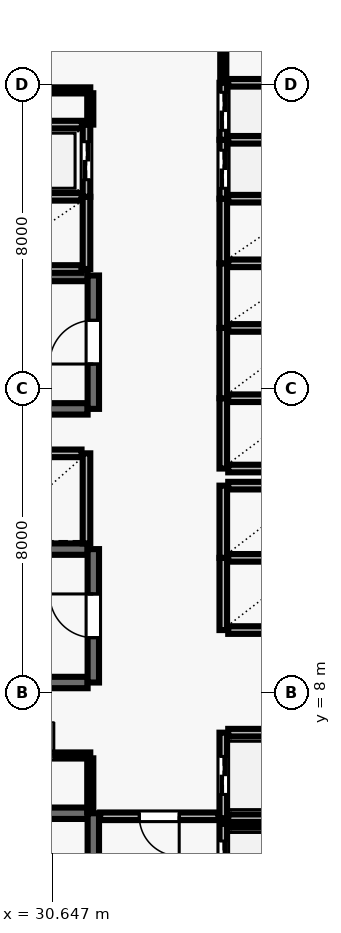
"""IFC4 building model, lengths in metres.
Left out: names, types, materials, properties, quantities, classifications, styles, units other than length and angle.
Written with IfcOpenShell. Run it as: python <this file> out.ifc"""

import sys

from ifc_helpers import new_model, si_unit, direction, frame, frame_2d, origin, place, context, subcontext, project, spatial, rectangle, extrude, element, fill, save


model = new_model("IFC4")
c1 = context("Model", 3, precision=1e-05, world=origin(), true_north=direction((0.0, 1.0)))
c2 = subcontext(c1, "Body", "Model", "MODEL_VIEW")
j1 = project(units=[si_unit("LENGTHUNIT", "METRE"), si_unit("PLANEANGLEUNIT", "RADIAN")], contexts=[c1])
p1 = place(None, origin())
s1 = spatial("IfcSite", under=j1, at=p1, CompositionType="ELEMENT")
p2 = place(p1, origin())
s2 = spatial("IfcBuilding", under=s1, at=p2, CompositionType="ELEMENT")
p3 = place(p2, frame((0.0, 0.0, 50.5)))
s3 = spatial("IfcBuildingStorey", under=s2, at=p3, CompositionType="ELEMENT", Elevation=50.5)
p4 = place(p3, frame((31.58, 4.83, 0.0), z_axis=(0.0, 0.0, 1.0), x_axis=(-1.0, 0.0, 0.0)))
e1 = element("IfcWall", 1, at=p4, inside=s3, PredefinedType="SHEAR", context=c2, shape_type="SweptSolid", body=[
    extrude(rectangle(XDim=8.36, YDim=0.3, at=frame_2d((4.18, 0.0))), origin(), (0.0, 0.0, 1.0), 3.69),
])
p5 = place(p3, frame((31.73, 0.96, 0.0), z_axis=(0.0, 0.0, 1.0), x_axis=(0.0, 1.0, 0.0)))
e2 = element("IfcWall", 2, at=p5, inside=s3, PredefinedType="SHEAR", context=c2, shape_type="SweptSolid", body=[
    extrude(rectangle(XDim=3.87, YDim=0.3, at=frame_2d((1.935, 0.0))), origin(), (0.0, 0.0, 1.0), 3.69),
])
p6 = place(p5, frame((1.54, 0.0, 0.0)))
e3 = element("IfcOpeningElement", 3, at=p6, cuts=e2, PredefinedType="OPENING", context=c2, shape_type="SweptSolid", body=[
    extrude(rectangle(XDim=1.15, YDim=2.15, at=frame_2d((0.575, 1.075))), frame((0.0, 0.16, 0.0), z_axis=(0.0, -1.0, 0.0), x_axis=(1.0, 0.0, 0.0)), (0.0, 0.0, 1.0), 0.32),
])
for number, where, z_axis, x_axis in (
    (4, (31.58, 18.98, 0.0), (0.0, 0.0, 1.0), (-1.0, 0.0, 0.0)),
    (5, (23.22, 15.47, 0.0), (0.0, 0.0, 1.0), (1.0, 0.0, 0.0)),
):
    element("IfcWall", number, at=place(p3, frame(where, z_axis=z_axis, x_axis=x_axis)), inside=s3, PredefinedType="SHEAR", context=c2, shape_type="SweptSolid", body=[
        extrude(rectangle(XDim=8.36, YDim=0.3, at=frame_2d((4.18, 0.0))), origin(), (0.0, 0.0, 1.0), 3.69),
    ])
p7 = place(p3, frame((31.73, 15.47, 0.0), z_axis=(0.0, 0.0, 1.0), x_axis=(0.0, 1.0, 0.0)))
e6 = element("IfcWall", 6, at=p7, inside=s3, PredefinedType="SHEAR", context=c2, shape_type="SweptSolid", body=[
    extrude(rectangle(XDim=3.51, YDim=0.3, at=frame_2d((1.755, 0.0))), origin(), (0.0, 0.0, 1.0), 3.69),
])
p8 = place(p7, frame((1.18, 0.0, 0.0)))
e7 = element("IfcOpeningElement", 7, at=p8, cuts=e6, PredefinedType="OPENING", context=c2, shape_type="SweptSolid", body=[
    extrude(rectangle(XDim=1.15, YDim=2.15, at=frame_2d((0.575, 1.075))), frame((0.0, 0.16, 0.0), z_axis=(0.0, -1.0, 0.0), x_axis=(1.0, 0.0, 0.0)), (0.0, 0.0, 1.0), 0.32),
])
for number, where, z_axis, x_axis in (
    (8, (31.58, 11.78, 0.0), (0.0, 0.0, 1.0), (-1.0, 0.0, 0.0)),
    (9, (23.22, 8.27, 0.0), (0.0, 0.0, 1.0), (1.0, 0.0, 0.0)),
):
    element("IfcWall", number, at=place(p3, frame(where, z_axis=z_axis, x_axis=x_axis)), inside=s3, PredefinedType="SHEAR", context=c2, shape_type="SweptSolid", body=[
        extrude(rectangle(XDim=8.36, YDim=0.3, at=frame_2d((4.18, 0.0))), origin(), (0.0, 0.0, 1.0), 3.69),
    ])
p9 = place(p3, frame((31.73, 8.27, 0.0), z_axis=(0.0, 0.0, 1.0), x_axis=(0.0, 1.0, 0.0)))
e10 = element("IfcWall", 10, at=p9, inside=s3, PredefinedType="SHEAR", context=c2, shape_type="SweptSolid", body=[
    extrude(rectangle(XDim=3.51, YDim=0.3, at=frame_2d((1.755, 0.0))), origin(), (0.0, 0.0, 1.0), 3.69),
])
p10 = place(p9, frame((1.18, 0.0, 0.0)))
e11 = element("IfcOpeningElement", 11, at=p10, cuts=e10, PredefinedType="OPENING", context=c2, shape_type="SweptSolid", body=[
    extrude(rectangle(XDim=1.15, YDim=2.15, at=frame_2d((0.575, 1.075))), frame((0.0, 0.16, 0.0), z_axis=(0.0, -1.0, 0.0), x_axis=(1.0, 0.0, 0.0)), (0.0, 0.0, 1.0), 0.32),
])
p11 = place(p3, frame((35.15, 4.55, 0.0), z_axis=(0.0, 0.0, 1.0), x_axis=(0.0, -1.0, 0.0)))
e12 = element("IfcWall", 12, at=p11, inside=s3, PredefinedType="SOLIDWALL", context=c2, shape_type="SweptSolid", body=[
    extrude(rectangle(XDim=2.1, YDim=0.2, at=frame_2d((1.05, 0.0))), origin(), (0.0, 0.0, 1.0), 3.69),
])
p12 = place(p11, frame((0.45, 0.0, 0.0)))
e13 = element("IfcOpeningElement", 13, at=p12, cuts=e12, PredefinedType="OPENING", context=c2, shape_type="SweptSolid", body=[
    extrude(rectangle(XDim=1.2, YDim=2.15, at=frame_2d((0.6, 1.075))), frame((0.0, 0.11, 0.0), z_axis=(0.0, -1.0, 0.0), x_axis=(1.0, 0.0, 0.0)), (0.0, 0.0, 1.0), 0.22),
])
p13 = place(p3, frame((37.42, 4.55, 0.0), z_axis=(0.0, 0.0, 1.0), x_axis=(-1.0, 0.0, 0.0)))
e14 = element("IfcWall", 14, at=p13, inside=s3, PredefinedType="SOLIDWALL", context=c2, shape_type="SweptSolid", body=[
    extrude(rectangle(XDim=2.14, YDim=0.2, at=frame_2d((1.07, 0.0))), origin(), (0.0, 0.0, 1.0), 3.69),
])
p14 = place(p3, frame((35.15, 6.95, 0.0), z_axis=(0.0, 0.0, 1.0), x_axis=(0.0, -1.0, 0.0)))
e15 = element("IfcWall", 15, at=p14, inside=s3, PredefinedType="SOLIDWALL", context=c2, shape_type="SweptSolid", body=[
    extrude(rectangle(XDim=2.25, YDim=0.2, at=frame_2d((1.125, 0.0))), origin(), (0.0, 0.0, 1.0), 3.69),
])
p15 = place(p14, frame((0.625, 0.0, 0.0)))
e16 = element("IfcOpeningElement", 16, at=p15, cuts=e15, PredefinedType="OPENING", context=c2, shape_type="SweptSolid", body=[
    extrude(rectangle(XDim=1.0, YDim=2.1, at=frame_2d((0.5, 1.05))), frame((0.0, 0.11, 0.0), z_axis=(0.0, -1.0, 0.0), x_axis=(1.0, 0.0, 0.0)), (0.0, 0.0, 1.0), 0.22),
])
for number, where, z_axis, x_axis in (
    (17, (35.28, 4.7, 0.0), (0.0, 0.0, 1.0), (1.0, 0.0, 0.0)),
    (18, (37.42, 6.95, 0.0), (0.0, 0.0, 1.0), (-1.0, 0.0, 0.0)),
):
    element("IfcWall", number, at=place(p3, frame(where, z_axis=z_axis, x_axis=x_axis)), inside=s3, PredefinedType="SOLIDWALL", context=c2, shape_type="SweptSolid", body=[
        extrude(rectangle(XDim=2.14, YDim=0.2, at=frame_2d((1.07, 0.0))), origin(), (0.0, 0.0, 1.0), 3.69),
    ])
p16 = place(p3, frame((35.15, 11.55, 0.0), z_axis=(0.0, 0.0, 1.0), x_axis=(0.0, -1.0, 0.0)))
e19 = element("IfcWall", 19, at=p16, inside=s3, PredefinedType="SOLIDWALL", context=c2, shape_type="SweptSolid", body=[
    extrude(rectangle(XDim=1.9, YDim=0.2, at=frame_2d((0.95, 0.0))), origin(), (0.0, 0.0, 1.0), 3.69),
])
for number, where, z_axis, x_axis in (
    (20, (35.28, 9.65, 0.0), (0.0, 0.0, 1.0), (1.0, 0.0, 0.0)),
    (21, (37.42, 11.55, 0.0), (0.0, 0.0, 1.0), (-1.0, 0.0, 0.0)),
):
    element("IfcWall", number, at=place(p3, frame(where, z_axis=z_axis, x_axis=x_axis)), inside=s3, PredefinedType="SOLIDWALL", context=c2, shape_type="SweptSolid", body=[
        extrude(rectangle(XDim=2.14, YDim=0.2, at=frame_2d((1.07, 0.0))), origin(), (0.0, 0.0, 1.0), 3.69),
    ])
p17 = place(p3, frame((35.15, 13.45, 0.0), z_axis=(0.0, 0.0, 1.0), x_axis=(0.0, -1.0, 0.0)))
e22 = element("IfcWall", 22, at=p17, inside=s3, PredefinedType="SOLIDWALL", context=c2, shape_type="SweptSolid", body=[
    extrude(rectangle(XDim=1.9, YDim=0.2, at=frame_2d((0.95, 0.0))), origin(), (0.0, 0.0, 1.0), 3.69),
])
p18 = place(p3, frame((37.42, 13.45, 0.0), z_axis=(0.0, 0.0, 1.0), x_axis=(-1.0, 0.0, 0.0)))
e23 = element("IfcWall", 23, at=p18, inside=s3, PredefinedType="SOLIDWALL", context=c2, shape_type="SweptSolid", body=[
    extrude(rectangle(XDim=2.14, YDim=0.2, at=frame_2d((1.07, 0.0))), origin(), (0.0, 0.0, 1.0), 3.69),
])
p19 = place(p3, frame((31.55, 11.93, 0.0), z_axis=(0.0, 0.0, 1.0), x_axis=(0.0, 1.0, 0.0)))
e24 = element("IfcWall", 24, at=p19, inside=s3, PredefinedType="SOLIDWALL", context=c2, shape_type="SweptSolid", body=[
    extrude(rectangle(XDim=2.37, YDim=0.2, at=frame_2d((1.185, 0.0))), origin(), (0.0, 0.0, 1.0), 3.69),
])
p20 = place(p3, frame((31.42, 14.3, 0.0), z_axis=(0.0, 0.0, 1.0), x_axis=(-1.0, 0.0, 0.0)))
e25 = element("IfcWall", 25, at=p20, inside=s3, PredefinedType="SOLIDWALL", context=c2, shape_type="SweptSolid", body=[
    extrude(rectangle(XDim=2.44, YDim=0.2, at=frame_2d((1.22, 0.0))), origin(), (0.0, 0.0, 1.0), 3.69),
])
p21 = place(p3, frame((35.15, 15.75, 0.0), z_axis=(0.0, 0.0, 1.0), x_axis=(0.0, -1.0, 0.0)))
e26 = element("IfcWall", 26, at=p21, inside=s3, PredefinedType="SOLIDWALL", context=c2, shape_type="SweptSolid", body=[
    extrude(rectangle(XDim=1.85, YDim=0.2, at=frame_2d((0.925, 0.0))), origin(), (0.0, 0.0, 1.0), 3.69),
])
for number, where, z_axis, x_axis in (
    (27, (35.28, 13.9, 0.0), (0.0, 0.0, 1.0), (1.0, 0.0, 0.0)),
    (28, (37.42, 15.75, 0.0), (0.0, 0.0, 1.0), (-1.0, 0.0, 0.0)),
):
    element("IfcWall", number, at=place(p3, frame(where, z_axis=z_axis, x_axis=x_axis)), inside=s3, PredefinedType="SOLIDWALL", context=c2, shape_type="SweptSolid", body=[
        extrude(rectangle(XDim=2.14, YDim=0.2, at=frame_2d((1.07, 0.0))), origin(), (0.0, 0.0, 1.0), 3.69),
    ])
p22 = place(p3, frame((35.15, 17.6, 0.0), z_axis=(0.0, 0.0, 1.0), x_axis=(0.0, -1.0, 0.0)))
e29 = element("IfcWall", 29, at=p22, inside=s3, PredefinedType="SOLIDWALL", context=c2, shape_type="SweptSolid", body=[
    extrude(rectangle(XDim=1.85, YDim=0.2, at=frame_2d((0.925, 0.0))), origin(), (0.0, 0.0, 1.0), 3.69),
])
p23 = place(p3, frame((37.42, 17.6, 0.0), z_axis=(0.0, 0.0, 1.0), x_axis=(-1.0, 0.0, 0.0)))
e30 = element("IfcWall", 30, at=p23, inside=s3, PredefinedType="SOLIDWALL", context=c2, shape_type="SweptSolid", body=[
    extrude(rectangle(XDim=2.14, YDim=0.2, at=frame_2d((1.07, 0.0))), origin(), (0.0, 0.0, 1.0), 3.69),
])
p24 = place(p3, frame((35.15, 19.3, 0.0), z_axis=(0.0, 0.0, 1.0), x_axis=(0.0, -1.0, 0.0)))
e31 = element("IfcWall", 31, at=p24, inside=s3, PredefinedType="SOLIDWALL", context=c2, shape_type="SweptSolid", body=[
    extrude(rectangle(XDim=1.7, YDim=0.2, at=frame_2d((0.85, 0.0))), origin(), (0.0, 0.0, 1.0), 3.69),
])
p25 = place(p3, frame((37.42, 19.3, 0.0), z_axis=(0.0, 0.0, 1.0), x_axis=(-1.0, 0.0, 0.0)))
e32 = element("IfcWall", 32, at=p25, inside=s3, PredefinedType="SOLIDWALL", context=c2, shape_type="SweptSolid", body=[
    extrude(rectangle(XDim=2.14, YDim=0.2, at=frame_2d((1.07, 0.0))), origin(), (0.0, 0.0, 1.0), 3.69),
])
p26 = place(p3, frame((35.15, 21.0, 0.0), z_axis=(0.0, 0.0, 1.0), x_axis=(0.0, -1.0, 0.0)))
e33 = element("IfcWall", 33, at=p26, inside=s3, PredefinedType="SOLIDWALL", context=c2, shape_type="SweptSolid", body=[
    extrude(rectangle(XDim=1.7, YDim=0.2, at=frame_2d((0.85, 0.0))), origin(), (0.0, 0.0, 1.0), 3.69),
])
p27 = place(p3, frame((37.42, 21.0, 0.0), z_axis=(0.0, 0.0, 1.0), x_axis=(-1.0, 0.0, 0.0)))
e34 = element("IfcWall", 34, at=p27, inside=s3, PredefinedType="SOLIDWALL", context=c2, shape_type="SweptSolid", body=[
    extrude(rectangle(XDim=2.14, YDim=0.2, at=frame_2d((1.07, 0.0))), origin(), (0.0, 0.0, 1.0), 3.69),
])
p28 = place(p3, frame((31.55, 19.15, 0.0), z_axis=(0.0, 0.0, 1.0), x_axis=(0.0, 1.0, 0.0)))
e35 = element("IfcWall", 35, at=p28, inside=s3, PredefinedType="SOLIDWALL", context=c2, shape_type="SweptSolid", body=[
    extrude(rectangle(XDim=1.9, YDim=0.2, at=frame_2d((0.95, 0.0))), origin(), (0.0, 0.0, 1.0), 3.69),
])
for number, where, z_axis, x_axis in (
    (36, (28.98, 19.15, 0.0), (0.0, 0.0, 1.0), (1.0, 0.0, 0.0)),
    (37, (31.42, 21.05, 0.0), (0.0, 0.0, 1.0), (-1.0, 0.0, 0.0)),
):
    element("IfcWall", number, at=place(p3, frame(where, z_axis=z_axis, x_axis=x_axis)), inside=s3, PredefinedType="SOLIDWALL", context=c2, shape_type="SweptSolid", body=[
        extrude(rectangle(XDim=2.44, YDim=0.2, at=frame_2d((1.22, 0.0))), origin(), (0.0, 0.0, 1.0), 3.69),
    ])
p29 = place(p3, frame((35.15, 22.55, 0.0), z_axis=(0.0, 0.0, 1.0), x_axis=(0.0, -1.0, 0.0)))
e38 = element("IfcWall", 38, at=p29, inside=s3, PredefinedType="SOLIDWALL", context=c2, shape_type="SweptSolid", body=[
    extrude(rectangle(XDim=1.55, YDim=0.2, at=frame_2d((0.775, 0.0))), origin(), (0.0, 0.0, 1.0), 3.69),
])
p30 = place(p29, frame((0.275, 0.0, 0.0)))
e39 = element("IfcOpeningElement", 39, at=p30, cuts=e38, PredefinedType="OPENING", context=c2, shape_type="SweptSolid", body=[
    extrude(rectangle(XDim=1.0, YDim=2.1, at=frame_2d((0.5, 1.05))), frame((0.0, 0.11, 0.0), z_axis=(0.0, -1.0, 0.0), x_axis=(1.0, 0.0, 0.0)), (0.0, 0.0, 1.0), 0.22),
])
p31 = place(p3, frame((37.42, 22.55, 0.0), z_axis=(0.0, 0.0, 1.0), x_axis=(-1.0, 0.0, 0.0)))
e40 = element("IfcWall", 40, at=p31, inside=s3, PredefinedType="SOLIDWALL", context=c2, shape_type="SweptSolid", body=[
    extrude(rectangle(XDim=2.14, YDim=0.2, at=frame_2d((1.07, 0.0))), origin(), (0.0, 0.0, 1.0), 3.69),
])
p32 = place(p3, frame((35.15, 24.05, 0.0), z_axis=(0.0, 0.0, 1.0), x_axis=(0.0, -1.0, 0.0)))
e41 = element("IfcWall", 41, at=p32, inside=s3, PredefinedType="SOLIDWALL", context=c2, shape_type="SweptSolid", body=[
    extrude(rectangle(XDim=1.5, YDim=0.2, at=frame_2d((0.75, 0.0))), origin(), (0.0, 0.0, 1.0), 3.69),
])
p33 = place(p32, frame((0.25, 0.0, 0.0)))
e42 = element("IfcOpeningElement", 42, at=p33, cuts=e41, PredefinedType="OPENING", context=c2, shape_type="SweptSolid", body=[
    extrude(rectangle(XDim=1.0, YDim=2.1, at=frame_2d((0.5, 1.05))), frame((0.0, 0.11, 0.0), z_axis=(0.0, -1.0, 0.0), x_axis=(1.0, 0.0, 0.0)), (0.0, 0.0, 1.0), 0.22),
])
p34 = place(p3, frame((37.42, 24.05, 0.0), z_axis=(0.0, 0.0, 1.0), x_axis=(-1.0, 0.0, 0.0)))
e43 = element("IfcWall", 43, at=p34, inside=s3, PredefinedType="SOLIDWALL", context=c2, shape_type="SweptSolid", body=[
    extrude(rectangle(XDim=2.14, YDim=0.2, at=frame_2d((1.07, 0.0))), origin(), (0.0, 0.0, 1.0), 3.69),
])
p35 = place(p3, frame((31.55, 21.05, 0.0), z_axis=(0.0, 0.0, 1.0), x_axis=(0.0, 1.0, 0.0)))
e44 = element("IfcWall", 44, at=p35, inside=s3, PredefinedType="SOLIDWALL", context=c2, shape_type="SweptSolid", body=[
    extrude(rectangle(XDim=1.9, YDim=0.2, at=frame_2d((0.95, 0.0))), origin(), (0.0, 0.0, 1.0), 3.69),
])
p36 = place(p35, frame((0.45, 0.0, 0.0)))
e45 = element("IfcOpeningElement", 45, at=p36, cuts=e44, PredefinedType="OPENING", context=c2, shape_type="SweptSolid", body=[
    extrude(rectangle(XDim=1.0, YDim=2.1, at=frame_2d((0.5, 1.05))), frame((0.0, 0.11, 0.0), z_axis=(0.0, -1.0, 0.0), x_axis=(1.0, 0.0, 0.0)), (0.0, 0.0, 1.0), 0.22),
])
p37 = place(p3, frame((31.43, 22.95, 0.0), z_axis=(0.0, 0.0, 1.0), x_axis=(-1.0, 0.0, 0.0)))
e46 = element("IfcWall", 46, at=p37, inside=s3, PredefinedType="SOLIDWALL", context=c2, shape_type="SweptSolid", body=[
    extrude(rectangle(XDim=2.46, YDim=0.2, at=frame_2d((1.23, 0.0))), origin(), (0.0, 0.0, 1.0), 3.69),
])
p38 = place(p3, frame((28.8, 23.85, 0.0), z_axis=(0.0, 0.0, 1.0), x_axis=(1.0, 0.0, 0.0)))
e47 = element("IfcWall", 47, at=p38, inside=s3, PredefinedType="PARTITIONING", context=c2, shape_type="SweptSolid", body=[
    extrude(rectangle(XDim=2.85, YDim=0.16, at=frame_2d((1.425, 0.0))), origin(), (0.0, 0.0, 1.0), 3.69),
])
p39 = place(p3, frame((28.85, 6.35, 0.0), z_axis=(0.0, 0.0, 1.0), x_axis=(1.0, 0.0, 0.0)))
e48 = element("IfcWall", 48, at=p39, inside=s3, PredefinedType="PARTITIONING", context=c2, shape_type="SweptSolid", body=[
    extrude(rectangle(XDim=2.8, YDim=0.16, at=frame_2d((1.4, 0.0))), origin(), (0.0, 0.0, 1.0), 3.69),
])
p40 = place(p39, frame((0.96, 0.0, 0.0)))
e49 = element("IfcOpeningElement", 49, at=p40, cuts=e48, PredefinedType="OPENING", context=c2, shape_type="SweptSolid", body=[
    extrude(rectangle(XDim=0.88, YDim=2.1, at=frame_2d((0.44, 1.05))), frame((0.0, 0.09, 0.0), z_axis=(0.0, -1.0, 0.0), x_axis=(1.0, 0.0, 0.0)), (0.0, 0.0, 1.0), 0.18),
])
p41 = place(p3, frame((35.02, 4.75, 0.0), z_axis=(0.0, 0.0, 1.0), x_axis=(-1.0, 0.0, 0.0)))
e50 = element("IfcWall", 50, at=p41, inside=s3, PredefinedType="SOLIDWALL", context=c2, shape_type="SweptSolid", body=[
    extrude(rectangle(XDim=3.11, YDim=0.2, at=frame_2d((1.555, 0.0))), origin(), (0.0, 0.0, 1.0), 3.69),
])
p42 = place(p41, frame((1.03, 0.0, 0.0)))
e51 = element("IfcOpeningElement", 51, at=p42, cuts=e50, PredefinedType="OPENING", context=c2, shape_type="SweptSolid", body=[
    extrude(rectangle(XDim=1.05, YDim=2.15, at=frame_2d((0.525, 1.075))), frame((0.0, 0.11, 0.0), z_axis=(0.0, -1.0, 0.0), x_axis=(1.0, 0.0, 0.0)), (0.0, 0.0, 1.0), 0.22),
])
p43 = place(p3, frame((31.65, 4.86, 0.0), z_axis=(0.0, 0.0, 1.0), x_axis=(0.0, 1.0, 0.0)))
e52 = element("IfcWall", 52, at=p43, inside=s3, PredefinedType="PARTITIONING", context=c2, shape_type="SweptSolid", body=[
    extrude(rectangle(XDim=1.415, YDim=0.16, at=frame_2d((0.708, 0.0))), origin(), (0.0, 0.0, 1.0), 3.69),
])
p44 = place(p3, frame((31.65, 23.775, 0.0), z_axis=(0.0, 0.0, 1.0), x_axis=(0.0, -1.0, 0.0)))
e53 = element("IfcWall", 53, at=p44, inside=s3, PredefinedType="PARTITIONING", context=c2, shape_type="SweptSolid", body=[
    extrude(rectangle(XDim=0.825, YDim=0.16, at=frame_2d((0.413, 0.0))), origin(), (0.0, 0.0, 1.0), 3.69),
])
p45 = place(p3, frame((35.15, 24.07, 0.0), z_axis=(0.0, 0.0, 1.0), x_axis=(0.0, 1.0, 0.0)))
e54 = element("IfcWall", 54, at=p45, inside=s3, PredefinedType="PARTITIONING", context=c2, shape_type="SweptSolid", body=[
    extrude(rectangle(XDim=1.855, YDim=0.16, at=frame_2d((0.927, 0.0))), origin(), (0.0, 0.0, 1.0), 3.69),
])
p46 = place(p8, origin())
e55 = element("IfcDoor", 55, at=p46, inside=s3, OperationType="SINGLE_SWING_LEFT", PredefinedType="DOOR", context=c2, shape_type="SweptSolid", body=[
    extrude(rectangle(XDim=1.15, YDim=2.15, at=frame_2d((0.575, 1.075))), frame((0.0, 0.025, 0.0), z_axis=(0.0, -1.0, 0.0), x_axis=(1.0, 0.0, 0.0)), (0.0, 0.0, 1.0), 0.05),
])
fill(e7, e55)
p47 = place(p10, origin())
e56 = element("IfcDoor", 56, at=p47, inside=s3, OperationType="SINGLE_SWING_RIGHT", PredefinedType="DOOR", context=c2, shape_type="SweptSolid", body=[
    extrude(rectangle(XDim=1.15, YDim=2.15, at=frame_2d((0.575, 1.075))), frame((0.0, 0.025, 0.0), z_axis=(0.0, -1.0, 0.0), x_axis=(1.0, 0.0, 0.0)), (0.0, 0.0, 1.0), 0.05),
])
fill(e11, e56)
p48 = place(p12, origin())
e57 = element("IfcDoor", 57, at=p48, inside=s3, OperationType="DOUBLE_DOOR_SLIDING", PredefinedType="DOOR", context=c2, shape_type="SweptSolid", body=[
    extrude(rectangle(XDim=1.2, YDim=2.15, at=frame_2d((0.6, 1.075))), frame((0.0, 0.025, 0.0), z_axis=(0.0, -1.0, 0.0), x_axis=(1.0, 0.0, 0.0)), (0.0, 0.0, 1.0), 0.05),
])
fill(e13, e57)
p49 = place(p15, origin())
e58 = element("IfcDoor", 58, at=p49, inside=s3, OperationType="DOUBLE_DOOR_SLIDING", PredefinedType="DOOR", context=c2, shape_type="SweptSolid", body=[
    extrude(rectangle(XDim=1.0, YDim=2.1, at=frame_2d((0.5, 1.05))), frame((0.0, 0.025, 0.0), z_axis=(0.0, -1.0, 0.0), x_axis=(1.0, 0.0, 0.0)), (0.0, 0.0, 1.0), 0.05),
])
fill(e16, e58)
p50 = place(p30, origin())
e59 = element("IfcDoor", 59, at=p50, inside=s3, OperationType="DOUBLE_DOOR_SLIDING", PredefinedType="DOOR", context=c2, shape_type="SweptSolid", body=[
    extrude(rectangle(XDim=1.0, YDim=2.1, at=frame_2d((0.5, 1.05))), frame((0.0, 0.025, 0.0), z_axis=(0.0, -1.0, 0.0), x_axis=(1.0, 0.0, 0.0)), (0.0, 0.0, 1.0), 0.05),
])
fill(e39, e59)
p51 = place(p33, origin())
e60 = element("IfcDoor", 60, at=p51, inside=s3, OperationType="DOUBLE_DOOR_SLIDING", PredefinedType="DOOR", context=c2, shape_type="SweptSolid", body=[
    extrude(rectangle(XDim=1.0, YDim=2.1, at=frame_2d((0.5, 1.05))), frame((0.0, 0.025, 0.0), z_axis=(0.0, -1.0, 0.0), x_axis=(1.0, 0.0, 0.0)), (0.0, 0.0, 1.0), 0.05),
])
fill(e42, e60)
p52 = place(p36, origin())
e61 = element("IfcDoor", 61, at=p52, inside=s3, OperationType="DOUBLE_DOOR_SLIDING", PredefinedType="DOOR", context=c2, shape_type="SweptSolid", body=[
    extrude(rectangle(XDim=1.0, YDim=2.1, at=frame_2d((0.5, 1.05))), frame((0.0, 0.025, 0.0), z_axis=(0.0, -1.0, 0.0), x_axis=(1.0, 0.0, 0.0)), (0.0, 0.0, 1.0), 0.05),
])
fill(e45, e61)
p53 = place(p42, origin())
e62 = element("IfcDoor", 62, at=p53, inside=s3, OperationType="SINGLE_SWING_LEFT", PredefinedType="DOOR", context=c2, shape_type="SweptSolid", body=[
    extrude(rectangle(XDim=1.05, YDim=2.15, at=frame_2d((0.525, 1.075))), frame((0.0, 0.025, 0.0), z_axis=(0.0, -1.0, 0.0), x_axis=(1.0, 0.0, 0.0)), (0.0, 0.0, 1.0), 0.05),
])
fill(e51, e62)
p54 = place(p40, origin())
e63 = element("IfcDoor", 63, at=p54, inside=s3, OperationType="SINGLE_SWING_RIGHT", PredefinedType="DOOR", context=c2, shape_type="SweptSolid", body=[
    extrude(rectangle(XDim=0.88, YDim=2.1, at=frame_2d((0.44, 1.05))), frame((0.0, 0.025, 0.0), z_axis=(0.0, -1.0, 0.0), x_axis=(1.0, 0.0, 0.0)), (0.0, 0.0, 1.0), 0.05),
])
fill(e49, e63)
save(model, sys.argv[1])
